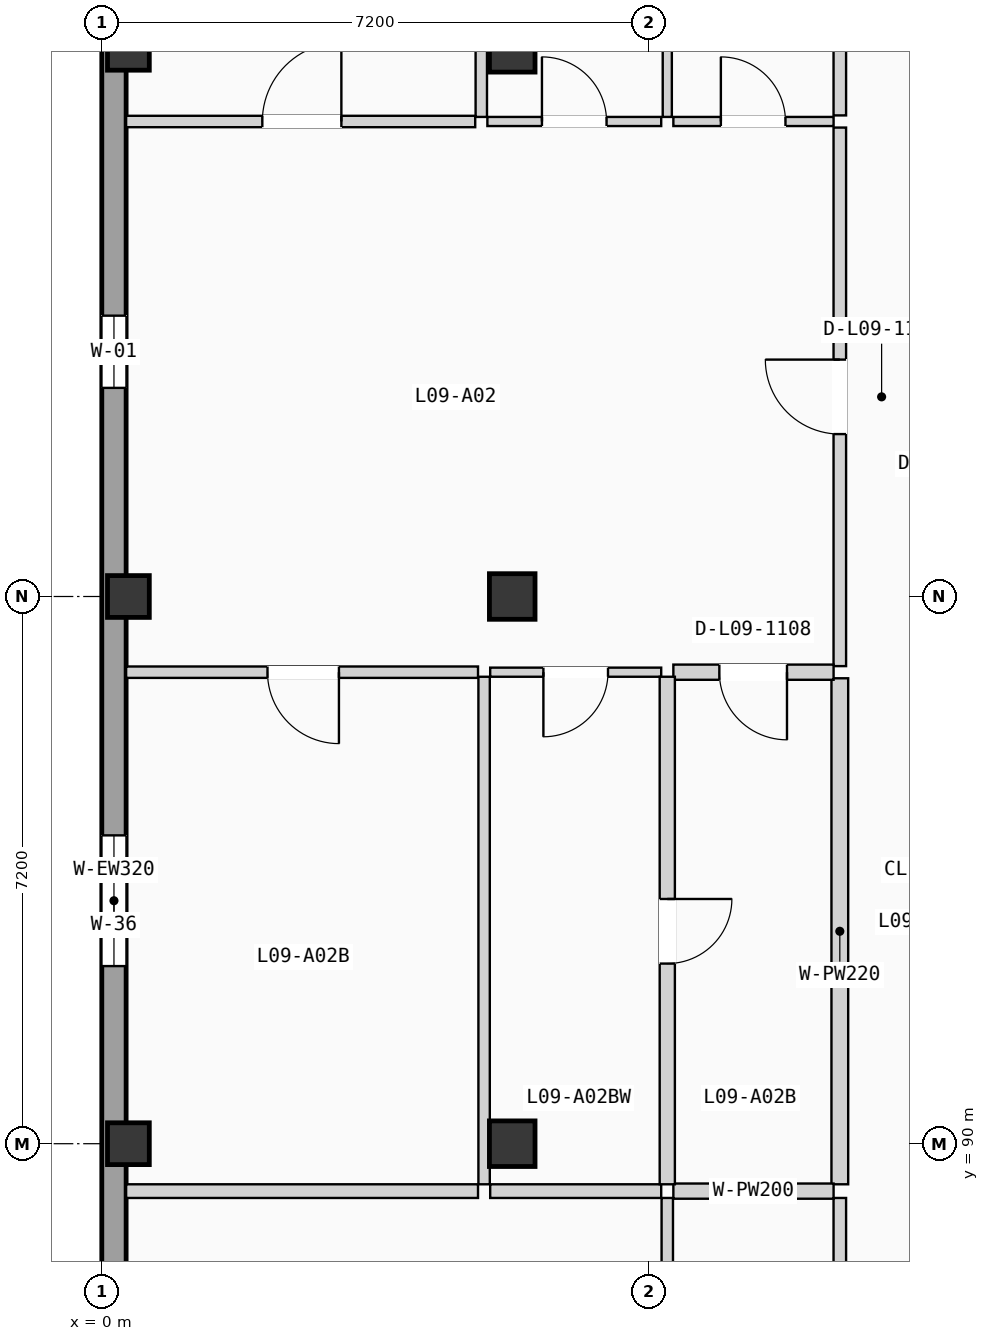
"""IFC4 building model, lengths in metres.
Left out: names, types, materials, properties, quantities, classifications, styles, units other than length and angle.
Written with IfcOpenShell. Run it as: python <this file> out.ifc"""

import sys

from ifc_helpers import new_model, si_unit, direction, frame, frame_2d, origin, origin_2d, place, context, subcontext, project, spatial, rectangle, extrude, element, fill, save


model = new_model("IFC4")
c1 = context("Model", 3, precision=1e-05, world=origin(), true_north=direction((0.0, 1.0)))
c2 = subcontext(c1, "Body", "Model", "MODEL_VIEW")
j1 = project(units=[si_unit("LENGTHUNIT", "METRE"), si_unit("PLANEANGLEUNIT", "RADIAN")], contexts=[c1])
p1 = place(None, origin())
s1 = spatial("IfcSite", under=j1, at=p1, CompositionType="ELEMENT")
p2 = place(p1, origin())
s2 = spatial("IfcBuilding", under=s1, at=p2, CompositionType="ELEMENT")
p3 = place(p2, frame((0.0, 0.0, 30.975)))
s3 = spatial("IfcBuildingStorey", under=s2, at=p3, CompositionType="ELEMENT", Elevation=30.975)
for number, where, z_axis, x_axis in (
    (1, (0.35, 90.0, 0.0), (0.0, 0.0, 1.0), (1.0, 0.0, 0.0)),
    (2, (0.35, 97.2, 0.0), (0.0, 0.0, 1.0), (1.0, 0.0, 0.0)),
    (3, (0.35, 104.4, 0.0), (0.0, 0.0, 1.0), (1.0, 0.0, 0.0)),
):
    element("IfcColumn", number, at=place(p3, frame(where, z_axis=z_axis, x_axis=x_axis)), inside=s3, PredefinedType="COLUMN", context=c2, shape_type="SweptSolid", body=[
        extrude(rectangle(XDim=0.55, YDim=0.55, at=origin_2d()), origin(), (0.0, 0.0, 1.0), 3.15),
    ])
for number, where, z_axis, x_axis in (
    (4, (5.4, 90.0, 0.0), (0.0, 0.0, 1.0), (1.0, 0.0, 0.0)),
    (5, (5.4, 97.2, 0.0), (0.0, 0.0, 1.0), (1.0, 0.0, 0.0)),
    (6, (5.4, 104.4, 0.0), (0.0, 0.0, 1.0), (1.0, 0.0, 0.0)),
):
    element("IfcColumn", number, at=place(p3, frame(where, z_axis=z_axis, x_axis=x_axis)), inside=s3, PredefinedType="COLUMN", context=c2, shape_type="SweptSolid", body=[
        extrude(rectangle(XDim=0.6, YDim=0.6, at=origin_2d()), origin(), (0.0, 0.0, 1.0), 3.15),
    ])
p4 = place(p3, frame((0.16, 68.72, 0.0), z_axis=(0.0, 0.0, 1.0), x_axis=(0.0, 1.0, 0.0)))
e7 = element("IfcWall", 7, at=p4, inside=s3, PredefinedType="SOLIDWALL", context=c2, shape_type="SweptSolid", body=[
    extrude(rectangle(XDim=49.76, YDim=0.32, at=frame_2d((24.88, 0.0))), origin(), (0.0, 0.0, 1.0), 2.9),
])
p5 = place(p4, frame((11.844, 0.0, 0.865)))
e8 = element("IfcOpeningElement", 8, at=p5, cuts=e7, PredefinedType="OPENING", context=c2, shape_type="SweptSolid", body=[
    extrude(rectangle(XDim=1.6, YDim=1.35, at=frame_2d((0.8, 0.675))), frame((0.0, 0.17, 0.0), z_axis=(0.0, -1.0, 0.0), x_axis=(1.0, 0.0, 0.0)), (0.0, 0.0, 1.0), 0.34),
])
p6 = place(p4, frame((8.499, 0.0, 0.715)))
e9 = element("IfcOpeningElement", 9, at=p6, cuts=e7, PredefinedType="OPENING", context=c2, shape_type="SweptSolid", body=[
    extrude(rectangle(XDim=1.6, YDim=1.5, at=frame_2d((0.8, 0.75))), frame((0.0, 0.17, 0.0), z_axis=(0.0, -1.0, 0.0), x_axis=(1.0, 0.0, 0.0)), (0.0, 0.0, 1.0), 0.34),
])
p7 = place(p4, frame((17.747, 0.0, 0.565)))
e10 = element("IfcOpeningElement", 10, at=p7, cuts=e7, PredefinedType="OPENING", context=c2, shape_type="SweptSolid", body=[
    extrude(rectangle(XDim=1.6, YDim=1.65, at=frame_2d((0.8, 0.825))), frame((0.0, 0.17, 0.0), z_axis=(0.0, -1.0, 0.0), x_axis=(1.0, 0.0, 0.0)), (0.0, 0.0, 1.0), 0.34),
])
p8 = place(p4, frame((31.225, 0.0, 0.85)))
e11 = element("IfcOpeningElement", 11, at=p8, cuts=e7, PredefinedType="OPENING", context=c2, shape_type="SweptSolid", body=[
    extrude(rectangle(XDim=0.95, YDim=1.2, at=frame_2d((0.475, 0.6))), frame((0.0, 0.17, 0.0), z_axis=(0.0, -1.0, 0.0), x_axis=(1.0, 0.0, 0.0)), (0.0, 0.0, 1.0), 0.34),
])
p9 = place(p4, frame((23.617, 0.0, 0.9)))
e12 = element("IfcOpeningElement", 12, at=p9, cuts=e7, PredefinedType="OPENING", context=c2, shape_type="SweptSolid", body=[
    extrude(rectangle(XDim=1.72, YDim=1.2, at=frame_2d((0.86, 0.6))), frame((0.0, 0.17, 0.0), z_axis=(0.0, -1.0, 0.0), x_axis=(1.0, 0.0, 0.0)), (0.0, 0.0, 1.0), 0.34),
])
p10 = place(p4, frame((38.355, 0.0, 0.865)))
e13 = element("IfcOpeningElement", 13, at=p10, cuts=e7, PredefinedType="OPENING", context=c2, shape_type="SweptSolid", body=[
    extrude(rectangle(XDim=1.72, YDim=1.35, at=frame_2d((0.86, 0.675))), frame((0.0, 0.17, 0.0), z_axis=(0.0, -1.0, 0.0), x_axis=(1.0, 0.0, 0.0)), (0.0, 0.0, 1.0), 0.34),
])
p11 = place(p3, frame((9.71, 85.247, 0.0), z_axis=(0.0, 0.0, 1.0), x_axis=(0.0, 1.0, 0.0)))
e14 = element("IfcWall", 14, at=p11, inside=s3, PredefinedType="PARTITIONING", context=c2, shape_type="SweptSolid", body=[
    extrude(rectangle(XDim=4.039, YDim=0.165, at=frame_2d((2.02, 0.0))), origin(), (0.0, 0.0, 1.0), 2.87),
])
p12 = place(p3, frame((9.71, 96.284, 0.0), z_axis=(0.0, 0.0, 1.0), x_axis=(0.0, 1.0, 0.0)))
e15 = element("IfcWall", 15, at=p12, inside=s3, PredefinedType="PARTITIONING", context=c2, shape_type="SweptSolid", body=[
    extrude(rectangle(XDim=7.086, YDim=0.165, at=frame_2d((3.543, 0.0))), origin(), (0.0, 0.0, 1.0), 2.87),
])
p13 = place(p12, frame((3.053, 0.0, 0.0)))
e16 = element("IfcOpeningElement", 16, at=p13, cuts=e15, PredefinedType="OPENING", context=c2, shape_type="SweptSolid", body=[
    extrude(rectangle(XDim=0.98, YDim=2.08, at=frame_2d((0.49, 1.04))), frame((0.0, 0.093, 0.0), z_axis=(0.0, -1.0, 0.0), x_axis=(1.0, 0.0, 0.0)), (0.0, 0.0, 1.0), 0.185),
])
p14 = place(p3, frame((9.71, 89.466, 0.0), z_axis=(0.0, 0.0, 1.0), x_axis=(0.0, 1.0, 0.0)))
e17 = element("IfcWall", 17, at=p14, inside=s3, PredefinedType="PLUMBINGWALL", context=c2, shape_type="SweptSolid", body=[
    extrude(rectangle(XDim=6.658, YDim=0.22, at=frame_2d((3.329, 0.0))), origin(), (0.0, 0.0, 1.0), 2.87),
])
p15 = place(p3, frame((9.71, 103.53, 0.0), z_axis=(0.0, 0.0, 1.0), x_axis=(0.0, 1.0, 0.0)))
e18 = element("IfcWall", 18, at=p15, inside=s3, PredefinedType="PARTITIONING", context=c2, shape_type="SweptSolid", body=[
    extrude(rectangle(XDim=7.67, YDim=0.165, at=frame_2d((3.835, 0.0))), origin(), (0.0, 0.0, 1.0), 2.87),
])
p16 = place(p3, frame((7.44, 85.227, 0.0), z_axis=(0.0, 0.0, 1.0), x_axis=(0.0, 1.0, 0.0)))
e19 = element("IfcWall", 19, at=p16, inside=s3, PredefinedType="PARTITIONING", context=c2, shape_type="SweptSolid", body=[
    extrude(rectangle(XDim=4.059, YDim=0.15, at=frame_2d((2.029, 0.0))), origin(), (0.0, 0.0, 1.0), 2.87),
])
p17 = place(p3, frame((7.52, 89.376, 0.0), z_axis=(0.0, 0.0, 1.0), x_axis=(1.0, 0.0, 0.0)))
e20 = element("IfcWall", 20, at=p17, inside=s3, PredefinedType="PLUMBINGWALL", context=c2, shape_type="SweptSolid", body=[
    extrude(rectangle(XDim=2.108, YDim=0.2, at=frame_2d((1.054, 0.0))), origin(), (0.0, 0.0, 1.0), 2.87),
])
p18 = place(p3, frame((0.32, 89.376, 0.0), z_axis=(0.0, 0.0, 1.0), x_axis=(1.0, 0.0, 0.0)))
e21 = element("IfcWall", 21, at=p18, inside=s3, PredefinedType="PARTITIONING", context=c2, shape_type="SweptSolid", body=[
    extrude(rectangle(XDim=4.63, YDim=0.18, at=frame_2d((2.315, 0.0))), origin(), (0.0, 0.0, 1.0), 2.87),
])
p19 = place(p3, frame((5.11, 89.376, 0.0), z_axis=(0.0, 0.0, 1.0), x_axis=(1.0, 0.0, 0.0)))
e22 = element("IfcWall", 22, at=p19, inside=s3, PredefinedType="PARTITIONING", context=c2, shape_type="SweptSolid", body=[
    extrude(rectangle(XDim=2.25, YDim=0.18, at=frame_2d((1.125, 0.0))), origin(), (0.0, 0.0, 1.0), 2.87),
])
p20 = place(p3, frame((7.52, 96.204, 0.0), z_axis=(0.0, 0.0, 1.0), x_axis=(1.0, 0.0, 0.0)))
e23 = element("IfcWall", 23, at=p20, inside=s3, PredefinedType="PLUMBINGWALL", context=c2, shape_type="SweptSolid", body=[
    extrude(rectangle(XDim=2.108, YDim=0.2, at=frame_2d((1.054, 0.0))), origin(), (0.0, 0.0, 1.0), 2.87),
])
p21 = place(p20, frame((0.605, 0.0, 0.0)))
e24 = element("IfcOpeningElement", 24, at=p21, cuts=e23, PredefinedType="OPENING", context=c2, shape_type="SweptSolid", body=[
    extrude(rectangle(XDim=0.89, YDim=2.03, at=frame_2d((0.445, 1.015))), frame((0.0, 0.11, 0.0), z_axis=(0.0, -1.0, 0.0), x_axis=(1.0, 0.0, 0.0)), (0.0, 0.0, 1.0), 0.22),
])
p22 = place(p3, frame((7.52, 103.45, 0.0), z_axis=(0.0, 0.0, 1.0), x_axis=(1.0, 0.0, 0.0)))
e25 = element("IfcWall", 25, at=p22, inside=s3, PredefinedType="PARTITIONING", context=c2, shape_type="SweptSolid", body=[
    extrude(rectangle(XDim=2.108, YDim=0.12, at=frame_2d((1.054, 0.0))), origin(), (0.0, 0.0, 1.0), 2.87),
])
p23 = place(p22, frame((0.625, 0.0, 0.0)))
e26 = element("IfcOpeningElement", 26, at=p23, cuts=e25, PredefinedType="OPENING", context=c2, shape_type="SweptSolid", body=[
    extrude(rectangle(XDim=0.85, YDim=2.01, at=frame_2d((0.425, 1.005))), frame((0.0, 0.07, 0.0), z_axis=(0.0, -1.0, 0.0), x_axis=(1.0, 0.0, 0.0)), (0.0, 0.0, 1.0), 0.14),
])
p24 = place(p3, frame((0.32, 96.204, 0.0), z_axis=(0.0, 0.0, 1.0), x_axis=(1.0, 0.0, 0.0)))
e27 = element("IfcWall", 27, at=p24, inside=s3, PredefinedType="PARTITIONING", context=c2, shape_type="SweptSolid", body=[
    extrude(rectangle(XDim=4.63, YDim=0.15, at=frame_2d((2.315, 0.0))), origin(), (0.0, 0.0, 1.0), 2.87),
])
p25 = place(p24, frame((1.86, 0.0, 0.0)))
e28 = element("IfcOpeningElement", 28, at=p25, cuts=e27, PredefinedType="OPENING", context=c2, shape_type="SweptSolid", body=[
    extrude(rectangle(XDim=0.94, YDim=2.06, at=frame_2d((0.47, 1.03))), frame((0.0, 0.085, 0.0), z_axis=(0.0, -1.0, 0.0), x_axis=(1.0, 0.0, 0.0)), (0.0, 0.0, 1.0), 0.17),
])
p26 = place(p3, frame((5.11, 96.204, 0.0), z_axis=(0.0, 0.0, 1.0), x_axis=(1.0, 0.0, 0.0)))
e29 = element("IfcWall", 29, at=p26, inside=s3, PredefinedType="PARTITIONING", context=c2, shape_type="SweptSolid", body=[
    extrude(rectangle(XDim=2.25, YDim=0.12, at=frame_2d((1.125, 0.0))), origin(), (0.0, 0.0, 1.0), 2.87),
])
p27 = place(p26, frame((0.7, 0.0, 0.0)))
e30 = element("IfcOpeningElement", 30, at=p27, cuts=e29, PredefinedType="OPENING", context=c2, shape_type="SweptSolid", body=[
    extrude(rectangle(XDim=0.85, YDim=2.01, at=frame_2d((0.425, 1.005))), frame((0.0, 0.07, 0.0), z_axis=(0.0, -1.0, 0.0), x_axis=(1.0, 0.0, 0.0)), (0.0, 0.0, 1.0), 0.14),
])
p28 = place(p3, frame((0.32, 103.45, 0.0), z_axis=(0.0, 0.0, 1.0), x_axis=(1.0, 0.0, 0.0)))
e31 = element("IfcWall", 31, at=p28, inside=s3, PredefinedType="PARTITIONING", context=c2, shape_type="SweptSolid", body=[
    extrude(rectangle(XDim=4.593, YDim=0.15, at=frame_2d((2.296, 0.0))), origin(), (0.0, 0.0, 1.0), 2.87),
])
p29 = place(p28, frame((1.792, 0.0, 0.0)))
e32 = element("IfcOpeningElement", 32, at=p29, cuts=e31, PredefinedType="OPENING", context=c2, shape_type="SweptSolid", body=[
    extrude(rectangle(XDim=1.04, YDim=2.08, at=frame_2d((0.52, 1.04))), frame((0.0, 0.085, 0.0), z_axis=(0.0, -1.0, 0.0), x_axis=(1.0, 0.0, 0.0)), (0.0, 0.0, 1.0), 0.17),
])
p30 = place(p3, frame((5.073, 103.45, 0.0), z_axis=(0.0, 0.0, 1.0), x_axis=(1.0, 0.0, 0.0)))
e33 = element("IfcWall", 33, at=p30, inside=s3, PredefinedType="PARTITIONING", context=c2, shape_type="SweptSolid", body=[
    extrude(rectangle(XDim=2.287, YDim=0.12, at=frame_2d((1.144, 0.0))), origin(), (0.0, 0.0, 1.0), 2.87),
])
p31 = place(p30, frame((0.718, 0.0, 0.0)))
e34 = element("IfcOpeningElement", 34, at=p31, cuts=e33, PredefinedType="OPENING", context=c2, shape_type="SweptSolid", body=[
    extrude(rectangle(XDim=0.85, YDim=2.01, at=frame_2d((0.425, 1.005))), frame((0.0, 0.07, 0.0), z_axis=(0.0, -1.0, 0.0), x_axis=(1.0, 0.0, 0.0)), (0.0, 0.0, 1.0), 0.14),
])
p32 = place(p3, frame((7.44, 89.466, 0.0), z_axis=(0.0, 0.0, 1.0), x_axis=(0.0, 1.0, 0.0)))
e35 = element("IfcWall", 35, at=p32, inside=s3, PredefinedType="PLUMBINGWALL", context=c2, shape_type="SweptSolid", body=[
    extrude(rectangle(XDim=6.678, YDim=0.2, at=frame_2d((3.339, 0.0))), origin(), (0.0, 0.0, 1.0), 2.87),
])
p33 = place(p32, frame((2.904, 0.0, 0.0)))
e36 = element("IfcOpeningElement", 36, at=p33, cuts=e35, PredefinedType="OPENING", context=c2, shape_type="SweptSolid", body=[
    extrude(rectangle(XDim=0.85, YDim=2.01, at=frame_2d((0.425, 1.005))), frame((0.0, 0.11, 0.0), z_axis=(0.0, -1.0, 0.0), x_axis=(1.0, 0.0, 0.0)), (0.0, 0.0, 1.0), 0.22),
])
p34 = place(p3, frame((7.44, 103.51, 0.0), z_axis=(0.0, 0.0, 1.0), x_axis=(0.0, 1.0, 0.0)))
e37 = element("IfcWall", 37, at=p34, inside=s3, PredefinedType="PARTITIONING", context=c2, shape_type="SweptSolid", body=[
    extrude(rectangle(XDim=7.69, YDim=0.12, at=frame_2d((3.845, 0.0))), origin(), (0.0, 0.0, 1.0), 2.87),
])
p35 = place(p3, frame((5.03, 89.466, 0.0), z_axis=(0.0, 0.0, 1.0), x_axis=(0.0, 1.0, 0.0)))
e38 = element("IfcWall", 38, at=p35, inside=s3, PredefinedType="PARTITIONING", context=c2, shape_type="SweptSolid", body=[
    extrude(rectangle(XDim=6.678, YDim=0.15, at=frame_2d((3.339, 0.0))), origin(), (0.0, 0.0, 1.0), 2.87),
])
p36 = place(p3, frame((4.993, 103.51, 0.0), z_axis=(0.0, 0.0, 1.0), x_axis=(0.0, 1.0, 0.0)))
e39 = element("IfcWall", 39, at=p36, inside=s3, PredefinedType="PARTITIONING", context=c2, shape_type="SweptSolid", body=[
    extrude(rectangle(XDim=7.69, YDim=0.15, at=frame_2d((3.845, 0.0))), origin(), (0.0, 0.0, 1.0), 2.87),
])
p37 = place(p8, origin())
e40 = element("IfcWindow", 40, at=p37, inside=s3, PartitioningType="SINGLE_PANEL", PredefinedType="WINDOW", context=c2, shape_type="SweptSolid", body=[
    extrude(rectangle(XDim=0.95, YDim=1.2, at=frame_2d((0.475, 0.6))), frame((0.0, 0.03, 0.0), z_axis=(0.0, -1.0, 0.0), x_axis=(1.0, 0.0, 0.0)), (0.0, 0.0, 1.0), 0.06),
])
fill(e11, e40)
p38 = place(p9, origin())
e41 = element("IfcWindow", 41, at=p38, inside=s3, PartitioningType="DOUBLE_PANEL_VERTICAL", PredefinedType="WINDOW", context=c2, shape_type="SweptSolid", body=[
    extrude(rectangle(XDim=1.72, YDim=1.2, at=frame_2d((0.86, 0.6))), frame((0.0, 0.03, 0.0), z_axis=(0.0, -1.0, 0.0), x_axis=(1.0, 0.0, 0.0)), (0.0, 0.0, 1.0), 0.06),
])
fill(e12, e41)
p39 = place(p13, origin())
e42 = element("IfcDoor", 42, at=p39, inside=s3, OperationType="SINGLE_SWING_RIGHT", PredefinedType="DOOR", context=c2, shape_type="SweptSolid", body=[
    extrude(rectangle(XDim=0.98, YDim=2.08, at=frame_2d((0.49, 1.04))), frame((0.0, 0.025, 0.0), z_axis=(0.0, -1.0, 0.0), x_axis=(1.0, 0.0, 0.0)), (0.0, 0.0, 1.0), 0.05),
])
fill(e16, e42)
p40 = place(p21, frame((0.89, 0.0, 0.0), z_axis=(0.0, 0.0, 1.0), x_axis=(-1.0, 0.0, 0.0)))
e43 = element("IfcDoor", 43, at=p40, inside=s3, OperationType="SINGLE_SWING_RIGHT", PredefinedType="DOOR", context=c2, shape_type="SweptSolid", body=[
    extrude(rectangle(XDim=0.89, YDim=2.03, at=frame_2d((0.445, 1.015))), frame((0.0, 0.025, 0.0), z_axis=(0.0, -1.0, 0.0), x_axis=(1.0, 0.0, 0.0)), (0.0, 0.0, 1.0), 0.05),
])
fill(e24, e43)
p41 = place(p23, origin())
e44 = element("IfcDoor", 44, at=p41, inside=s3, OperationType="SINGLE_SWING_LEFT", PredefinedType="DOOR", context=c2, shape_type="SweptSolid", body=[
    extrude(rectangle(XDim=0.85, YDim=2.01, at=frame_2d((0.425, 1.005))), frame((0.0, 0.025, 0.0), z_axis=(0.0, -1.0, 0.0), x_axis=(1.0, 0.0, 0.0)), (0.0, 0.0, 1.0), 0.05),
])
fill(e26, e44)
p42 = place(p25, frame((0.94, 0.0, 0.0), z_axis=(0.0, 0.0, 1.0), x_axis=(-1.0, 0.0, 0.0)))
e45 = element("IfcDoor", 45, at=p42, inside=s3, OperationType="SINGLE_SWING_RIGHT", PredefinedType="DOOR", context=c2, shape_type="SweptSolid", body=[
    extrude(rectangle(XDim=0.94, YDim=2.06, at=frame_2d((0.47, 1.03))), frame((0.0, 0.025, 0.0), z_axis=(0.0, -1.0, 0.0), x_axis=(1.0, 0.0, 0.0)), (0.0, 0.0, 1.0), 0.05),
])
fill(e28, e45)
p43 = place(p27, frame((0.85, 0.0, 0.0), z_axis=(0.0, 0.0, 1.0), x_axis=(-1.0, 0.0, 0.0)))
e46 = element("IfcDoor", 46, at=p43, inside=s3, OperationType="SINGLE_SWING_LEFT", PredefinedType="DOOR", context=c2, shape_type="SweptSolid", body=[
    extrude(rectangle(XDim=0.85, YDim=2.01, at=frame_2d((0.425, 1.005))), frame((0.0, 0.025, 0.0), z_axis=(0.0, -1.0, 0.0), x_axis=(1.0, 0.0, 0.0)), (0.0, 0.0, 1.0), 0.05),
])
fill(e30, e46)
p44 = place(p29, origin())
e47 = element("IfcDoor", 47, at=p44, inside=s3, OperationType="SINGLE_SWING_RIGHT", PredefinedType="DOOR", context=c2, shape_type="SweptSolid", body=[
    extrude(rectangle(XDim=1.04, YDim=2.08, at=frame_2d((0.52, 1.04))), frame((0.0, 0.025, 0.0), z_axis=(0.0, -1.0, 0.0), x_axis=(1.0, 0.0, 0.0)), (0.0, 0.0, 1.0), 0.05),
])
fill(e32, e47)
p45 = place(p31, origin())
e48 = element("IfcDoor", 48, at=p45, inside=s3, OperationType="SINGLE_SWING_LEFT", PredefinedType="DOOR", context=c2, shape_type="SweptSolid", body=[
    extrude(rectangle(XDim=0.85, YDim=2.01, at=frame_2d((0.425, 1.005))), frame((0.0, 0.025, 0.0), z_axis=(0.0, -1.0, 0.0), x_axis=(1.0, 0.0, 0.0)), (0.0, 0.0, 1.0), 0.05),
])
fill(e34, e48)
p46 = place(p33, frame((0.85, 0.0, 0.0), z_axis=(0.0, 0.0, 1.0), x_axis=(-1.0, 0.0, 0.0)))
e49 = element("IfcDoor", 49, at=p46, inside=s3, OperationType="SINGLE_SWING_RIGHT", PredefinedType="DOOR", context=c2, shape_type="SweptSolid", body=[
    extrude(rectangle(XDim=0.85, YDim=2.01, at=frame_2d((0.425, 1.005))), frame((0.0, 0.025, 0.0), z_axis=(0.0, -1.0, 0.0), x_axis=(1.0, 0.0, 0.0)), (0.0, 0.0, 1.0), 0.05),
])
fill(e36, e49)
save(model, sys.argv[1])
